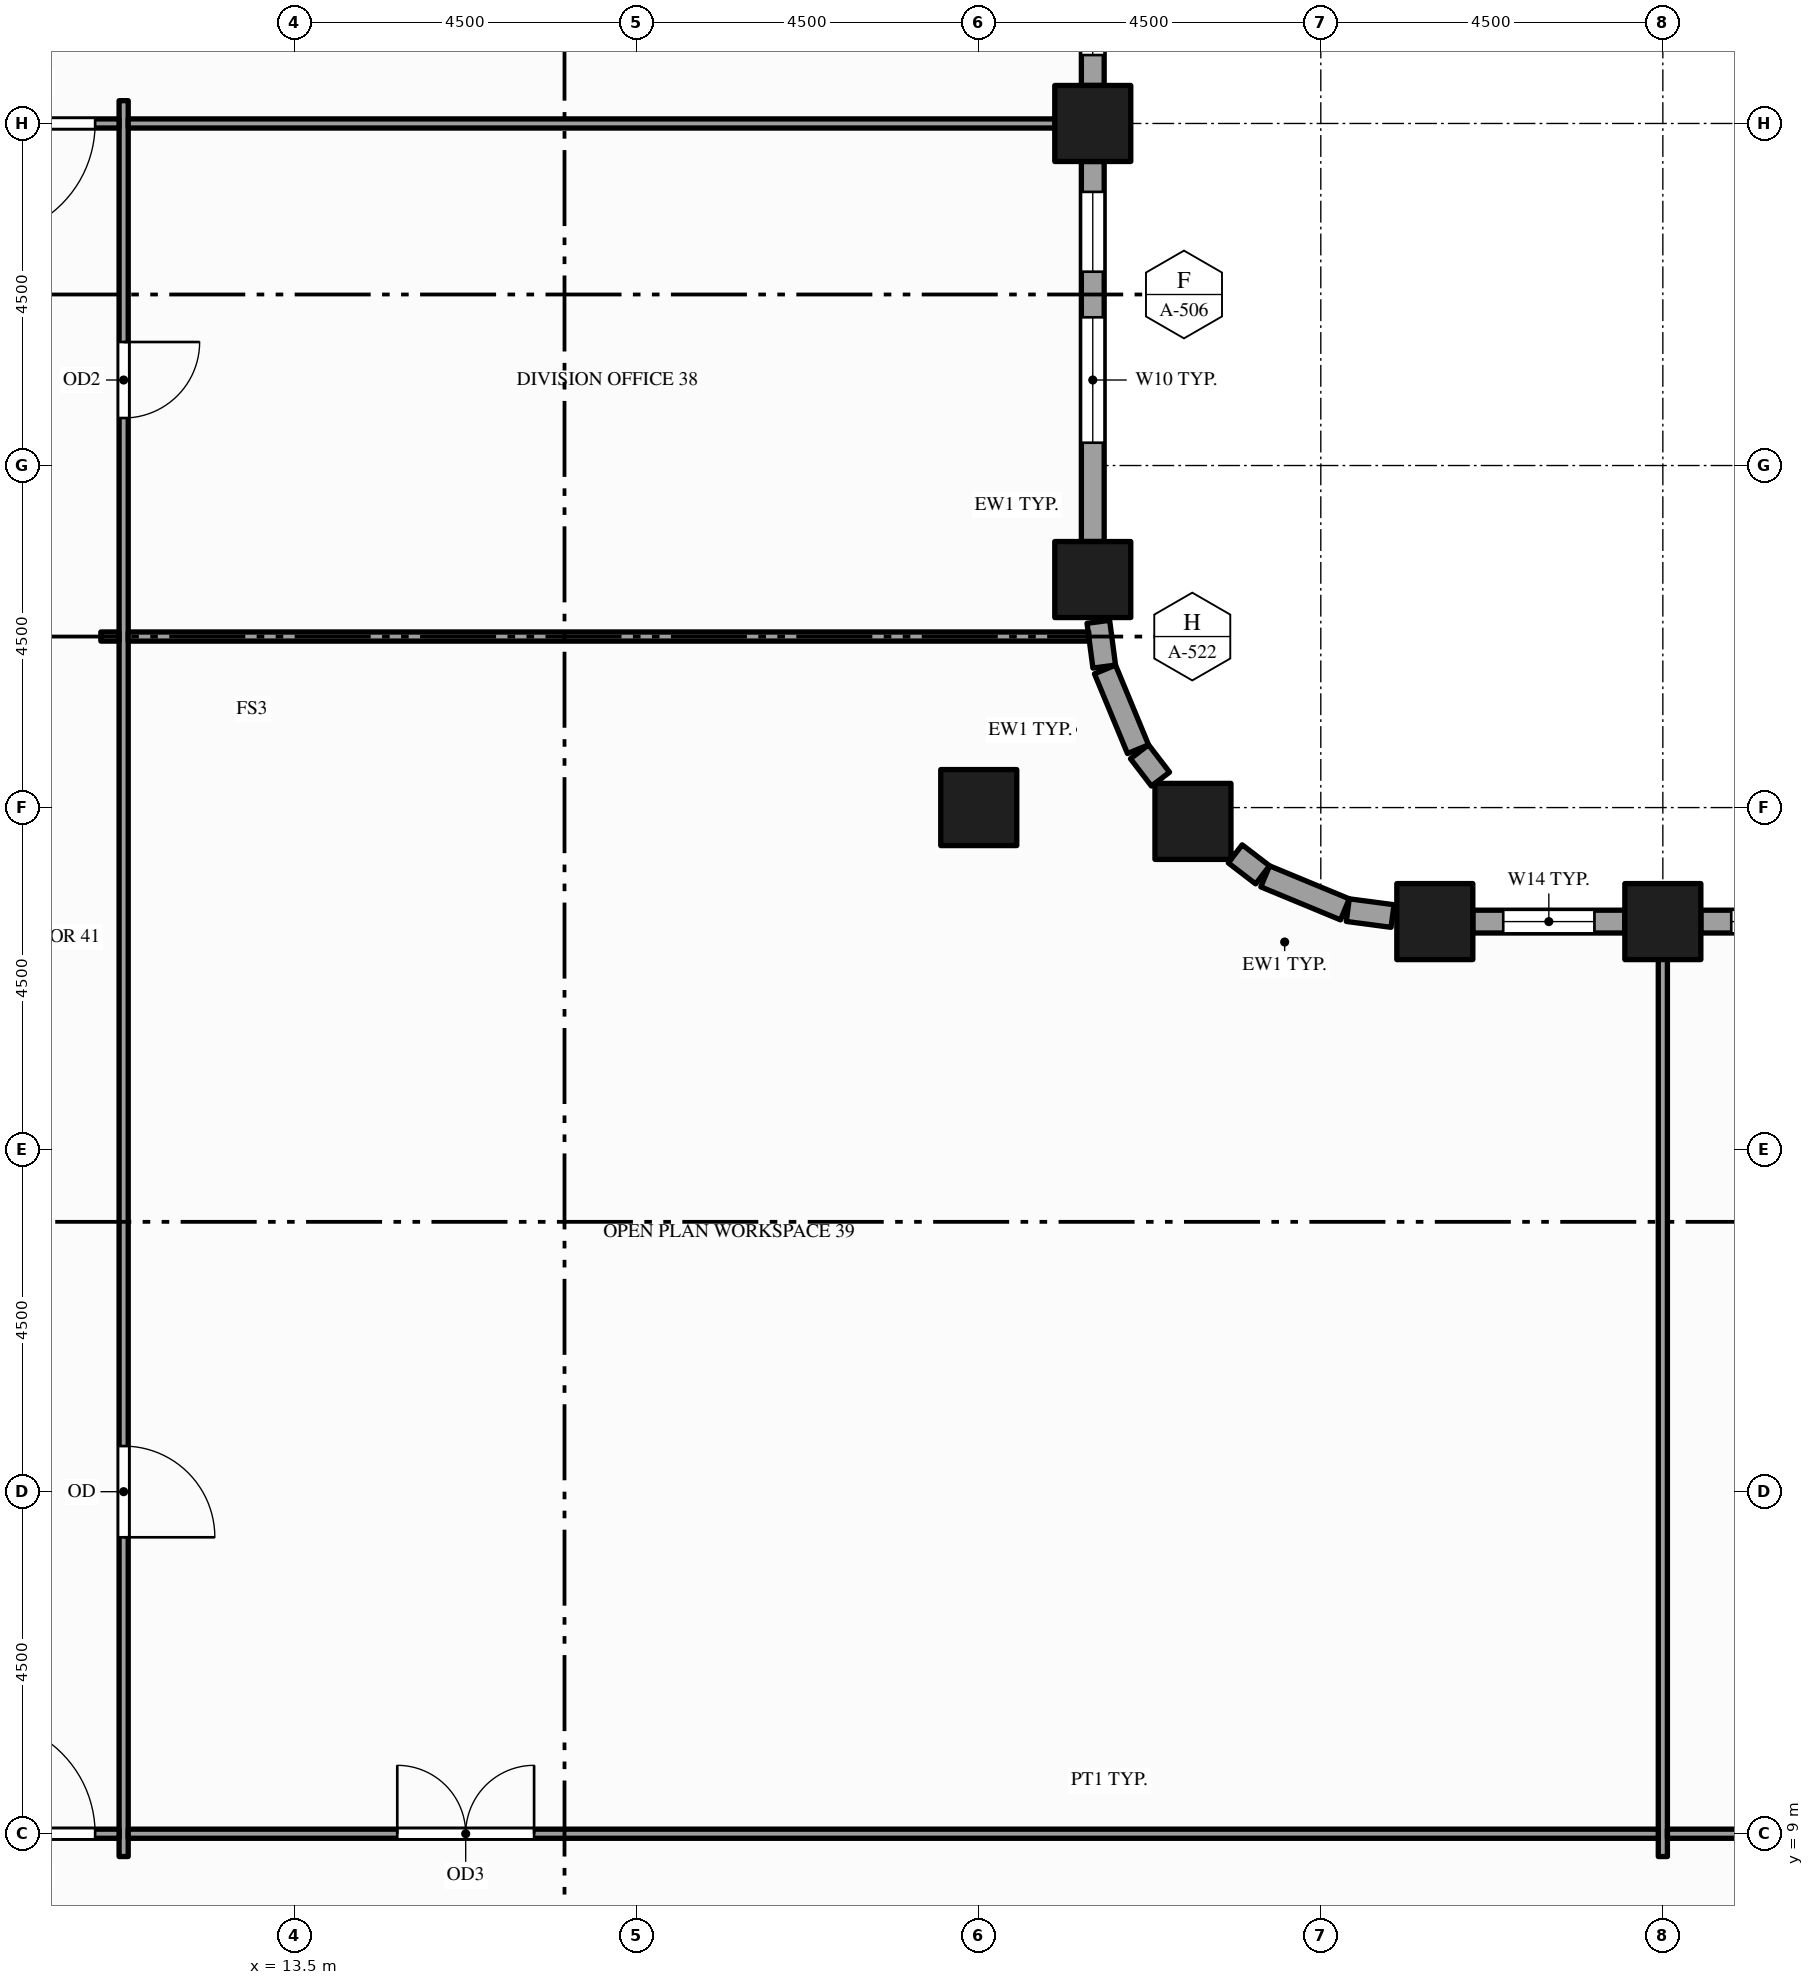
"""IFC4 building model, lengths in metres.
Left out: names, types, materials, properties, quantities, classifications, styles, units other than length and angle.
Written with IfcOpenShell. Run it as: python <this file> out.ifc"""

import sys

from ifc_helpers import new_model, si_unit, direction, frame, frame_2d, origin, origin_2d, place, context, subcontext, project, spatial, rectangle, hollow_rectangle, extrude, element, fill, save


model = new_model("IFC4")
c1 = context("Model", 3, precision=1e-05, world=origin(), true_north=direction((0.0, 1.0)))
c2 = subcontext(c1, "Body", "Model", "MODEL_VIEW")
j1 = project(units=[si_unit("LENGTHUNIT", "METRE"), si_unit("PLANEANGLEUNIT", "RADIAN")], contexts=[c1])
p1 = place(None, origin())
s1 = spatial("IfcSite", under=j1, at=p1, CompositionType="ELEMENT")
p2 = place(p1, origin())
s2 = spatial("IfcBuilding", under=s1, at=p2, CompositionType="ELEMENT")
p3 = place(p2, frame((0.0, 0.0, 107.0)))
s3 = spatial("IfcBuildingStorey", under=s2, at=p3, CompositionType="ELEMENT", Elevation=107.0)
for number, where, z_axis, x_axis in (
    (1, (22.5, 22.5, -0.15), (0.0, 0.0, 1.0), (1.0, 0.0, 0.0)),
    (2, (24.0, 25.5, -0.15), (0.0, 0.0, 1.0), (1.0, 0.0, 0.0)),
    (3, (24.0, 31.5, -0.15), (0.0, 0.0, 1.0), (1.0, 0.0, 0.0)),
    (4, (25.318, 22.318, -0.15), (0.0, 0.0, 1.0), (1.0, 0.0, 0.0)),
    (5, (28.5, 21.0, -0.15), (0.0, 0.0, 1.0), (1.0, 0.0, 0.0)),
    (6, (31.5, 21.0, -0.15), (0.0, 0.0, 1.0), (1.0, 0.0, 0.0)),
):
    element("IfcColumn", number, at=place(p3, frame(where, z_axis=z_axis, x_axis=x_axis)), inside=s3, PredefinedType="COLUMN", context=c2, shape_type="SweptSolid", body=[
        extrude(hollow_rectangle(XDim=1.0, YDim=1.0, WallThickness=0.05, at=origin_2d()), origin(), (0.0, 0.0, 1.0), 4.0),
    ])
p4 = place(p3, frame((35.5, 21.0, 0.0), z_axis=(0.0, 0.0, 1.0), x_axis=(-1.0, 0.0, 0.0)))
e7 = element("IfcWall", 7, at=p4, inside=s3, PredefinedType="STANDARD", context=c2, shape_type="SweptSolid", body=[
    extrude(rectangle(XDim=3.5, YDim=0.3, at=frame_2d((1.75, 0.0))), origin(), (0.0, 0.0, 1.0), 3.154),
])
p5 = place(p4, frame((0.4, 0.0, 0.9)))
e8 = element("IfcOpeningElement", 8, at=p5, cuts=e7, PredefinedType="OPENING", context=c2, shape_type="SweptSolid", body=[
    extrude(rectangle(XDim=1.05, YDim=2.0, at=frame_2d((0.525, 1.0))), frame((0.0, 0.16, 0.0), z_axis=(0.0, -1.0, 0.0), x_axis=(1.0, 0.0, 0.0)), (0.0, 0.0, 1.0), 0.32),
])
p6 = place(p4, frame((2.05, 0.0, 0.9)))
e9 = element("IfcOpeningElement", 9, at=p6, cuts=e7, PredefinedType="OPENING", context=c2, shape_type="SweptSolid", body=[
    extrude(rectangle(XDim=1.05, YDim=2.0, at=frame_2d((0.525, 1.0))), frame((0.0, 0.16, 0.0), z_axis=(0.0, -1.0, 0.0), x_axis=(1.0, 0.0, 0.0)), (0.0, 0.0, 1.0), 0.32),
])
p7 = place(p3, frame((31.0, 21.0, 0.0), z_axis=(0.0, 0.0, 1.0), x_axis=(-1.0, 0.0, 0.0)))
e10 = element("IfcWall", 10, at=p7, inside=s3, PredefinedType="STANDARD", context=c2, shape_type="SweptSolid", body=[
    extrude(rectangle(XDim=2.0, YDim=0.3, at=frame_2d((1.0, 0.0))), origin(), (0.0, 0.0, 1.0), 3.154),
])
p8 = place(p7, frame((0.4, 0.0, 0.9)))
e11 = element("IfcOpeningElement", 11, at=p8, cuts=e10, PredefinedType="OPENING", context=c2, shape_type="SweptSolid", body=[
    extrude(rectangle(XDim=1.2, YDim=2.0, at=frame_2d((0.6, 1.0))), frame((0.0, 0.16, 0.0), z_axis=(0.0, -1.0, 0.0), x_axis=(1.0, 0.0, 0.0)), (0.0, 0.0, 1.0), 0.32),
])
p9 = place(p3, frame((27.944, 21.073, 0.0), z_axis=(0.0, 0.0, 1.0), x_axis=(-0.991420685839, 0.130709692412, 0.0)))
e12 = element("IfcWall", 12, at=p9, inside=s3, PredefinedType="STANDARD", context=c2, shape_type="SweptSolid", body=[
    extrude(rectangle(XDim=0.594, YDim=0.3, at=frame_2d((0.297, 0.0))), origin(), (0.0, 0.0, 1.0), 3.154),
])
p10 = place(p3, frame((27.317, 21.161, 0.0), z_axis=(0.0, 0.0, 1.0), x_axis=(-0.923914616768, 0.382598720491, 0.0)))
e13 = element("IfcWall", 13, at=p10, inside=s3, PredefinedType="STANDARD", context=c2, shape_type="SweptSolid", body=[
    extrude(rectangle(XDim=1.135, YDim=0.3, at=frame_2d((0.568, 0.0))), origin(), (0.0, 0.0, 1.0), 2.938),
])
p11 = place(p3, frame((26.234, 21.615, 0.0), z_axis=(0.0, 0.0, 1.0), x_axis=(-0.793563062559, 0.608488016104, 0.0)))
e14 = element("IfcWall", 14, at=p11, inside=s3, PredefinedType="STANDARD", context=c2, shape_type="SweptSolid", body=[
    extrude(rectangle(XDim=0.454, YDim=0.3, at=frame_2d((0.227, 0.0))), origin(), (0.0, 0.0, 1.0), 3.154),
])
p12 = place(p3, frame((24.891, 22.874, 0.0), z_axis=(0.0, 0.0, 1.0), x_axis=(-0.608488016104, 0.793563062559, 0.0)))
e15 = element("IfcWall", 15, at=p12, inside=s3, PredefinedType="STANDARD", context=c2, shape_type="SweptSolid", body=[
    extrude(rectangle(XDim=0.454, YDim=0.3, at=frame_2d((0.227, 0.0))), origin(), (0.0, 0.0, 1.0), 2.76),
])
p13 = place(p3, frame((24.595, 23.268, 0.0), z_axis=(0.0, 0.0, 1.0), x_axis=(-0.382598720491, 0.923914616768, 0.0)))
e16 = element("IfcWall", 16, at=p13, inside=s3, PredefinedType="STANDARD", context=c2, shape_type="SweptSolid", body=[
    extrude(rectangle(XDim=1.135, YDim=0.3, at=frame_2d((0.568, 0.0))), origin(), (0.0, 0.0, 1.0), 3.154),
])
p14 = place(p3, frame((24.151, 24.355, 0.0), z_axis=(0.0, 0.0, 1.0), x_axis=(-0.130709692412, 0.991420685839, 0.0)))
e17 = element("IfcWall", 17, at=p14, inside=s3, PredefinedType="STANDARD", context=c2, shape_type="SweptSolid", body=[
    extrude(rectangle(XDim=0.594, YDim=0.3, at=frame_2d((0.297, 0.0))), origin(), (0.0, 0.0, 1.0), 3.154),
])
p15 = place(p3, frame((24.0, 26.0, 0.0), z_axis=(0.0, 0.0, 1.0), x_axis=(0.0, 1.0, 0.0)))
e18 = element("IfcWall", 18, at=p15, inside=s3, PredefinedType="STANDARD", context=c2, shape_type="SweptSolid", body=[
    extrude(rectangle(XDim=5.0, YDim=0.3, at=frame_2d((2.5, 0.0))), origin(), (0.0, 0.0, 1.0), 3.154),
])
p16 = place(p15, frame((1.3, 0.0, 0.9)))
e19 = element("IfcOpeningElement", 19, at=p16, cuts=e18, PredefinedType="OPENING", context=c2, shape_type="SweptSolid", body=[
    extrude(rectangle(XDim=1.65, YDim=2.0, at=frame_2d((0.825, 1.0))), frame((0.0, 0.16, 0.0), z_axis=(0.0, -1.0, 0.0), x_axis=(1.0, 0.0, 0.0)), (0.0, 0.0, 1.0), 0.32),
])
p17 = place(p15, frame((3.55, 0.0, 0.9)))
e20 = element("IfcOpeningElement", 20, at=p17, cuts=e18, PredefinedType="OPENING", context=c2, shape_type="SweptSolid", body=[
    extrude(rectangle(XDim=1.05, YDim=2.0, at=frame_2d((0.525, 1.0))), frame((0.0, 0.16, 0.0), z_axis=(0.0, -1.0, 0.0), x_axis=(1.0, 0.0, 0.0)), (0.0, 0.0, 1.0), 0.32),
])
p18 = place(p3, frame((24.0, 32.0, 0.0), z_axis=(0.0, 0.0, 1.0), x_axis=(0.0, 1.0, 0.0)))
e21 = element("IfcWall", 21, at=p18, inside=s3, PredefinedType="STANDARD", context=c2, shape_type="SweptSolid", body=[
    extrude(rectangle(XDim=3.5, YDim=0.3, at=frame_2d((1.75, 0.0))), origin(), (0.0, 0.0, 1.0), 3.154),
])
p19 = place(p18, frame((0.4, 0.0, 0.9)))
e22 = element("IfcOpeningElement", 22, at=p19, cuts=e21, PredefinedType="OPENING", context=c2, shape_type="SweptSolid", body=[
    extrude(rectangle(XDim=1.05, YDim=2.0, at=frame_2d((0.525, 1.0))), frame((0.0, 0.16, 0.0), z_axis=(0.0, -1.0, 0.0), x_axis=(1.0, 0.0, 0.0)), (0.0, 0.0, 1.0), 0.32),
])
p20 = place(p18, frame((2.05, 0.0, 0.9)))
e23 = element("IfcOpeningElement", 23, at=p20, cuts=e21, PredefinedType="OPENING", context=c2, shape_type="SweptSolid", body=[
    extrude(rectangle(XDim=1.05, YDim=2.0, at=frame_2d((0.525, 1.0))), frame((0.0, 0.16, 0.0), z_axis=(0.0, -1.0, 0.0), x_axis=(1.0, 0.0, 0.0)), (0.0, 0.0, 1.0), 0.32),
])
p21 = place(p3, frame((11.25, 8.7, 0.0), z_axis=(0.0, 0.0, 1.0), x_axis=(0.0, 1.0, 0.0)))
e24 = element("IfcWall", 24, at=p21, inside=s3, PredefinedType="PARTITIONING", context=c2, shape_type="SweptSolid", body=[
    extrude(rectangle(XDim=23.1, YDim=0.12, at=frame_2d((11.55, 0.0))), origin(), (0.0, 0.0, 1.0), 2.6),
])
p22 = place(p21, frame((18.925, 0.0, 0.0)))
e25 = element("IfcOpeningElement", 25, at=p22, cuts=e24, PredefinedType="OPENING", context=c2, shape_type="SweptSolid", body=[
    extrude(rectangle(XDim=1.0, YDim=2.1, at=frame_2d((0.5, 1.05))), frame((0.0, 0.07, 0.0), z_axis=(0.0, -1.0, 0.0), x_axis=(1.0, 0.0, 0.0)), (0.0, 0.0, 1.0), 0.14),
])
p23 = place(p21, frame((4.2, 0.0, 0.0)))
e26 = element("IfcOpeningElement", 26, at=p23, cuts=e24, PredefinedType="OPENING", context=c2, shape_type="SweptSolid", body=[
    extrude(rectangle(XDim=1.2, YDim=2.1, at=frame_2d((0.6, 1.05))), frame((0.0, 0.07, 0.0), z_axis=(0.0, -1.0, 0.0), x_axis=(1.0, 0.0, 0.0)), (0.0, 0.0, 1.0), 0.14),
])
p24 = place(p3, frame((31.5, 8.7, 0.0), z_axis=(0.0, 0.0, 1.0), x_axis=(0.0, 1.0, 0.0)))
e27 = element("IfcWall", 27, at=p24, inside=s3, PredefinedType="PARTITIONING", context=c2, shape_type="SweptSolid", body=[
    extrude(rectangle(XDim=12.15, YDim=0.12, at=frame_2d((6.075, 0.0))), origin(), (0.0, 0.0, 1.0), 2.938),
])
p25 = place(p3, frame((9.06, 9.0, 0.0), z_axis=(0.0, 0.0, 1.0), x_axis=(1.0, 0.0, 0.0)))
e28 = element("IfcWall", 28, at=p25, inside=s3, PredefinedType="PARTITIONING", context=c2, shape_type="SweptSolid", body=[
    extrude(rectangle(XDim=2.13, YDim=0.12, at=frame_2d((1.065, 0.0))), origin(), (0.0, 0.0, 1.0), 2.938),
])
p26 = place(p25, frame((0.315, 0.0, 0.0)))
e29 = element("IfcOpeningElement", 29, at=p26, cuts=e28, PredefinedType="OPENING", context=c2, shape_type="SweptSolid", body=[
    extrude(rectangle(XDim=1.5, YDim=2.1, at=frame_2d((0.75, 1.05))), frame((0.0, 0.07, 0.0), z_axis=(0.0, -1.0, 0.0), x_axis=(1.0, 0.0, 0.0)), (0.0, 0.0, 1.0), 0.14),
])
p27 = place(p3, frame((11.31, 9.0, 0.0), z_axis=(0.0, 0.0, 1.0), x_axis=(1.0, 0.0, 0.0)))
e30 = element("IfcWall", 30, at=p27, inside=s3, PredefinedType="PARTITIONING", context=c2, shape_type="SweptSolid", body=[
    extrude(rectangle(XDim=20.13, YDim=0.12, at=frame_2d((10.065, 0.0))), origin(), (0.0, 0.0, 1.0), 2.76),
])
p28 = place(p27, frame((3.54, 0.0, 0.0)))
e31 = element("IfcOpeningElement", 31, at=p28, cuts=e30, PredefinedType="OPENING", context=c2, shape_type="SweptSolid", body=[
    extrude(rectangle(XDim=1.8, YDim=2.1, at=frame_2d((0.9, 1.05))), frame((0.0, 0.07, 0.0), z_axis=(0.0, -1.0, 0.0), x_axis=(1.0, 0.0, 0.0)), (0.0, 0.0, 1.0), 0.14),
])
p29 = place(p3, frame((31.56, 9.0, 0.0), z_axis=(0.0, 0.0, 1.0), x_axis=(1.0, 0.0, 0.0)))
e32 = element("IfcWall", 32, at=p29, inside=s3, PredefinedType="PARTITIONING", context=c2, shape_type="SweptSolid", body=[
    extrude(rectangle(XDim=8.88, YDim=0.12, at=frame_2d((4.44, 0.0))), origin(), (0.0, 0.0, 1.0), 2.938),
])
p30 = place(p29, frame((3.54, 0.0, 0.0)))
e33 = element("IfcOpeningElement", 33, at=p30, cuts=e32, PredefinedType="OPENING", context=c2, shape_type="SweptSolid", body=[
    extrude(rectangle(XDim=1.8, YDim=2.1, at=frame_2d((0.9, 1.05))), frame((0.0, 0.07, 0.0), z_axis=(0.0, -1.0, 0.0), x_axis=(1.0, 0.0, 0.0)), (0.0, 0.0, 1.0), 0.14),
])
p31 = place(p3, frame((10.95, 24.75, 0.0), z_axis=(0.0, 0.0, 1.0), x_axis=(1.0, 0.0, 0.0)))
e34 = element("IfcWall", 34, at=p31, inside=s3, PredefinedType="PARTITIONING", context=c2, shape_type="SweptSolid", body=[
    extrude(rectangle(XDim=0.24, YDim=0.12, at=frame_2d((0.12, 0.0))), origin(), (0.0, 0.0, 1.0), 2.938),
])
p32 = place(p3, frame((11.31, 24.75, 0.0), z_axis=(0.0, 0.0, 1.0), x_axis=(1.0, 0.0, 0.0)))
e35 = element("IfcWall", 35, at=p32, inside=s3, PredefinedType="PARTITIONING", context=c2, shape_type="SweptSolid", body=[
    extrude(rectangle(XDim=12.637, YDim=0.12, at=frame_2d((6.319, 0.0))), origin(), (0.0, 0.0, 1.0), 2.938),
])
p33 = place(p3, frame((9.06, 31.5, 0.0), z_axis=(0.0, 0.0, 1.0), x_axis=(1.0, 0.0, 0.0)))
e36 = element("IfcWall", 36, at=p33, inside=s3, PredefinedType="PARTITIONING", context=c2, shape_type="SweptSolid", body=[
    extrude(rectangle(XDim=2.13, YDim=0.12, at=frame_2d((1.065, 0.0))), origin(), (0.0, 0.0, 1.0), 2.938),
])
p34 = place(p33, frame((0.315, 0.0, 0.0)))
e37 = element("IfcOpeningElement", 37, at=p34, cuts=e36, PredefinedType="OPENING", context=c2, shape_type="SweptSolid", body=[
    extrude(rectangle(XDim=1.5, YDim=2.1, at=frame_2d((0.75, 1.05))), frame((0.0, 0.07, 0.0), z_axis=(0.0, -1.0, 0.0), x_axis=(1.0, 0.0, 0.0)), (0.0, 0.0, 1.0), 0.14),
])
p35 = place(p3, frame((11.31, 31.5, 0.0), z_axis=(0.0, 0.0, 1.0), x_axis=(1.0, 0.0, 0.0)))
e38 = element("IfcWall", 38, at=p35, inside=s3, PredefinedType="PARTITIONING", context=c2, shape_type="SweptSolid", body=[
    extrude(rectangle(XDim=12.54, YDim=0.12, at=frame_2d((6.27, 0.0))), origin(), (0.0, 0.0, 1.0), 2.938),
])
p36 = place(p6, origin())
e39 = element("IfcWindow", 39, at=p36, inside=s3, PartitioningType="SINGLE_PANEL", PredefinedType="WINDOW", context=c2, shape_type="SweptSolid", body=[
    extrude(rectangle(XDim=1.05, YDim=2.0, at=frame_2d((0.525, 1.0))), frame((0.0, 0.03, 0.0), z_axis=(0.0, -1.0, 0.0), x_axis=(1.0, 0.0, 0.0)), (0.0, 0.0, 1.0), 0.06),
])
fill(e9, e39)
p37 = place(p8, origin())
e40 = element("IfcWindow", 40, at=p37, inside=s3, PartitioningType="SINGLE_PANEL", PredefinedType="WINDOW", context=c2, shape_type="SweptSolid", body=[
    extrude(rectangle(XDim=1.2, YDim=2.0, at=frame_2d((0.6, 1.0))), frame((0.0, 0.03, 0.0), z_axis=(0.0, -1.0, 0.0), x_axis=(1.0, 0.0, 0.0)), (0.0, 0.0, 1.0), 0.06),
])
fill(e11, e40)
p38 = place(p16, origin())
e41 = element("IfcWindow", 41, at=p38, inside=s3, PartitioningType="SINGLE_PANEL", PredefinedType="WINDOW", context=c2, shape_type="SweptSolid", body=[
    extrude(rectangle(XDim=1.65, YDim=2.0, at=frame_2d((0.825, 1.0))), frame((0.0, 0.03, 0.0), z_axis=(0.0, -1.0, 0.0), x_axis=(1.0, 0.0, 0.0)), (0.0, 0.0, 1.0), 0.06),
])
fill(e19, e41)
p39 = place(p17, origin())
e42 = element("IfcWindow", 42, at=p39, inside=s3, PartitioningType="SINGLE_PANEL", PredefinedType="WINDOW", context=c2, shape_type="SweptSolid", body=[
    extrude(rectangle(XDim=1.05, YDim=2.0, at=frame_2d((0.525, 1.0))), frame((0.0, 0.03, 0.0), z_axis=(0.0, -1.0, 0.0), x_axis=(1.0, 0.0, 0.0)), (0.0, 0.0, 1.0), 0.06),
])
fill(e20, e42)
p40 = place(p19, origin())
e43 = element("IfcWindow", 43, at=p40, inside=s3, PartitioningType="SINGLE_PANEL", PredefinedType="WINDOW", context=c2, shape_type="SweptSolid", body=[
    extrude(rectangle(XDim=1.05, YDim=2.0, at=frame_2d((0.525, 1.0))), frame((0.0, 0.03, 0.0), z_axis=(0.0, -1.0, 0.0), x_axis=(1.0, 0.0, 0.0)), (0.0, 0.0, 1.0), 0.06),
])
fill(e22, e43)
p41 = place(p28, origin())
e44 = element("IfcDoor", 44, at=p41, inside=s3, OperationType="DOUBLE_DOOR_SINGLE_SWING", PredefinedType="DOOR", context=c2, shape_type="SweptSolid", body=[
    extrude(rectangle(XDim=1.8, YDim=2.1, at=frame_2d((0.9, 1.05))), frame((0.0, 0.025, 0.0), z_axis=(0.0, -1.0, 0.0), x_axis=(1.0, 0.0, 0.0)), (0.0, 0.0, 1.0), 0.05),
])
fill(e31, e44)
p42 = place(p26, origin())
e45 = element("IfcDoor", 45, at=p42, inside=s3, OperationType="SINGLE_SWING_LEFT", PredefinedType="DOOR", context=c2, shape_type="SweptSolid", body=[
    extrude(rectangle(XDim=1.5, YDim=2.1, at=frame_2d((0.75, 1.05))), frame((0.0, 0.025, 0.0), z_axis=(0.0, -1.0, 0.0), x_axis=(1.0, 0.0, 0.0)), (0.0, 0.0, 1.0), 0.05),
])
fill(e29, e45)
p43 = place(p34, origin())
e46 = element("IfcDoor", 46, at=p43, inside=s3, OperationType="SINGLE_SWING_LEFT", PredefinedType="DOOR", context=c2, shape_type="SweptSolid", body=[
    extrude(rectangle(XDim=1.5, YDim=2.1, at=frame_2d((0.75, 1.05))), frame((0.0, 0.025, 0.0), z_axis=(0.0, -1.0, 0.0), x_axis=(1.0, 0.0, 0.0)), (0.0, 0.0, 1.0), 0.05),
])
fill(e37, e46)
p44 = place(p22, origin())
e47 = element("IfcDoor", 47, at=p44, inside=s3, OperationType="SINGLE_SWING_RIGHT", PredefinedType="DOOR", context=c2, shape_type="SweptSolid", body=[
    extrude(rectangle(XDim=1.0, YDim=2.1, at=frame_2d((0.5, 1.05))), frame((0.0, 0.025, 0.0), z_axis=(0.0, -1.0, 0.0), x_axis=(1.0, 0.0, 0.0)), (0.0, 0.0, 1.0), 0.05),
])
fill(e25, e47)
p45 = place(p23, origin())
e48 = element("IfcDoor", 48, at=p45, inside=s3, OperationType="SINGLE_SWING_LEFT", PredefinedType="DOOR", context=c2, shape_type="SweptSolid", body=[
    extrude(rectangle(XDim=1.2, YDim=2.1, at=frame_2d((0.6, 1.05))), frame((0.0, 0.025, 0.0), z_axis=(0.0, -1.0, 0.0), x_axis=(1.0, 0.0, 0.0)), (0.0, 0.0, 1.0), 0.05),
])
fill(e26, e48)
save(model, sys.argv[1])
